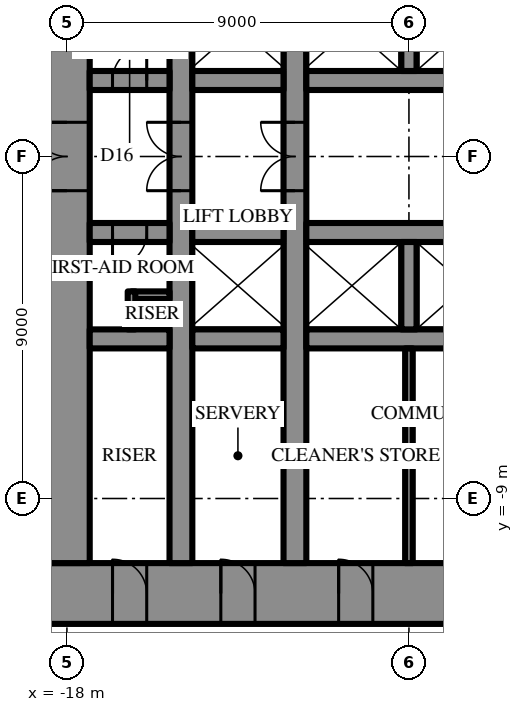
"""IFC4 building model, lengths in metres.
Left out: names, types, materials, properties, quantities, classifications, styles, units other than length and angle.
Written with IfcOpenShell. Run it as: python <this file> out.ifc"""

import sys

from ifc_helpers import new_model, si_unit, direction, frame, frame_2d, origin, place, context, subcontext, project, spatial, rectangle, extrude, element, fill, save


model = new_model("IFC4")
c1 = context("Model", 3, precision=1e-05, world=origin(), true_north=direction((0.0, 1.0)))
c2 = subcontext(c1, "Body", "Model", "MODEL_VIEW")
j1 = project(units=[si_unit("LENGTHUNIT", "METRE"), si_unit("PLANEANGLEUNIT", "RADIAN")], contexts=[c1])
p1 = place(None, origin())
s1 = spatial("IfcSite", under=j1, at=p1, CompositionType="ELEMENT")
p2 = place(p1, origin())
s2 = spatial("IfcBuilding", under=s1, at=p2, CompositionType="ELEMENT")
p3 = place(p2, frame((0.0, 0.0, 148.9)))
s3 = spatial("IfcBuildingStorey", under=s2, at=p3, CompositionType="ELEMENT", Elevation=148.9)
p4 = place(p3, frame((18.6, -11.5, 0.0), z_axis=(0.0, 0.0, 1.0), x_axis=(-1.0, 0.0, 0.0)))
e1 = element("IfcWall", 1, at=p4, inside=s3, PredefinedType="SHEAR", context=c2, shape_type="SweptSolid", body=[
    extrude(rectangle(XDim=37.2, YDim=1.6, at=frame_2d((18.6, 0.0))), origin(), (0.0, 0.0, 1.0), 4.2),
])
p5 = place(p4, frame((19.45, 0.0, 0.0)))
e2 = element("IfcOpeningElement", 2, at=p5, cuts=e1, PredefinedType="OPENING", context=c2, shape_type="SweptSolid", body=[
    extrude(rectangle(XDim=0.9, YDim=2.2, at=frame_2d((0.45, 1.1))), frame((0.0, 0.81, 0.0), z_axis=(0.0, -1.0, 0.0), x_axis=(1.0, 0.0, 0.0)), (0.0, 0.0, 1.0), 1.62),
])
p6 = place(p4, frame((22.45, 0.0, 0.0)))
e3 = element("IfcOpeningElement", 3, at=p6, cuts=e1, PredefinedType="OPENING", context=c2, shape_type="SweptSolid", body=[
    extrude(rectangle(XDim=0.9, YDim=2.2, at=frame_2d((0.45, 1.1))), frame((0.0, 0.81, 0.0), z_axis=(0.0, -1.0, 0.0), x_axis=(1.0, 0.0, 0.0)), (0.0, 0.0, 1.0), 1.62),
])
p7 = place(p4, frame((25.5, 0.0, 0.0)))
e4 = element("IfcOpeningElement", 4, at=p7, cuts=e1, PredefinedType="OPENING", context=c2, shape_type="SweptSolid", body=[
    extrude(rectangle(XDim=1.0, YDim=2.2, at=frame_2d((0.5, 1.1))), frame((0.0, 0.81, 0.0), z_axis=(0.0, -1.0, 0.0), x_axis=(1.0, 0.0, 0.0)), (0.0, 0.0, 1.0), 1.62),
])
p8 = place(p4, frame((1.8, 0.0, 0.0)))
e5 = element("IfcOpeningElement", 5, at=p8, cuts=e1, PredefinedType="OPENING", context=c2, shape_type="SweptSolid", body=[
    extrude(rectangle(XDim=0.9, YDim=2.2, at=frame_2d((0.45, 1.1))), frame((0.0, 0.81, 0.0), z_axis=(0.0, -1.0, 0.0), x_axis=(1.0, 0.0, 0.0)), (0.0, 0.0, 1.0), 1.62),
])
p9 = place(p4, frame((4.65, 0.0, 0.0)))
e6 = element("IfcOpeningElement", 6, at=p9, cuts=e1, PredefinedType="OPENING", context=c2, shape_type="SweptSolid", body=[
    extrude(rectangle(XDim=0.9, YDim=2.2, at=frame_2d((0.45, 1.1))), frame((0.0, 0.81, 0.0), z_axis=(0.0, -1.0, 0.0), x_axis=(1.0, 0.0, 0.0)), (0.0, 0.0, 1.0), 1.62),
])
p10 = place(p4, frame((7.75, 0.0, 0.0)))
e7 = element("IfcOpeningElement", 7, at=p10, cuts=e1, PredefinedType="OPENING", context=c2, shape_type="SweptSolid", body=[
    extrude(rectangle(XDim=0.9, YDim=2.2, at=frame_2d((0.45, 1.1))), frame((0.0, 0.81, 0.0), z_axis=(0.0, -1.0, 0.0), x_axis=(1.0, 0.0, 0.0)), (0.0, 0.0, 1.0), 1.62),
])
p11 = place(p4, frame((28.55, 0.0, 0.0)))
e8 = element("IfcOpeningElement", 8, at=p11, cuts=e1, PredefinedType="OPENING", context=c2, shape_type="SweptSolid", body=[
    extrude(rectangle(XDim=0.9, YDim=2.2, at=frame_2d((0.45, 1.1))), frame((0.0, 0.81, 0.0), z_axis=(0.0, -1.0, 0.0), x_axis=(1.0, 0.0, 0.0)), (0.0, 0.0, 1.0), 1.62),
])
p12 = place(p4, frame((31.65, 0.0, 0.0)))
e9 = element("IfcOpeningElement", 9, at=p12, cuts=e1, PredefinedType="OPENING", context=c2, shape_type="SweptSolid", body=[
    extrude(rectangle(XDim=0.9, YDim=2.2, at=frame_2d((0.45, 1.1))), frame((0.0, 0.81, 0.0), z_axis=(0.0, -1.0, 0.0), x_axis=(1.0, 0.0, 0.0)), (0.0, 0.0, 1.0), 1.62),
])
p13 = place(p4, frame((34.5, 0.0, 0.0)))
e10 = element("IfcOpeningElement", 10, at=p13, cuts=e1, PredefinedType="OPENING", context=c2, shape_type="SweptSolid", body=[
    extrude(rectangle(XDim=0.9, YDim=2.2, at=frame_2d((0.45, 1.1))), frame((0.0, 0.81, 0.0), z_axis=(0.0, -1.0, 0.0), x_axis=(1.0, 0.0, 0.0)), (0.0, 0.0, 1.0), 1.62),
])
p14 = place(p3, frame((-18.0, 10.7, 0.0), z_axis=(0.0, 0.0, 1.0), x_axis=(0.0, -1.0, 0.0)))
e11 = element("IfcWall", 11, at=p14, inside=s3, PredefinedType="SHEAR", context=c2, shape_type="SweptSolid", body=[
    extrude(rectangle(XDim=21.4, YDim=1.2, at=frame_2d((10.7, 0.0))), origin(), (0.0, 0.0, 1.0), 4.2),
])
p15 = place(p14, frame((9.8, 0.0, 0.0)))
e12 = element("IfcOpeningElement", 12, at=p15, cuts=e11, PredefinedType="OPENING", context=c2, shape_type="SweptSolid", body=[
    extrude(rectangle(XDim=1.8, YDim=2.4, at=frame_2d((0.9, 1.2))), frame((0.0, 0.61, 0.0), z_axis=(0.0, -1.0, 0.0), x_axis=(1.0, 0.0, 0.0)), (0.0, 0.0, 1.0), 1.22),
])
p16 = place(p3, frame((-12.0, -10.7, 0.0), z_axis=(0.0, 0.0, 1.0), x_axis=(0.0, 1.0, 0.0)))
e13 = element("IfcWall", 13, at=p16, inside=s3, PredefinedType="SHEAR", context=c2, shape_type="SweptSolid", body=[
    extrude(rectangle(XDim=21.4, YDim=0.6, at=frame_2d((10.7, 0.0))), origin(), (0.0, 0.0, 1.0), 4.2),
])
p17 = place(p16, frame((9.8, 0.0, 0.0)))
e14 = element("IfcOpeningElement", 14, at=p17, cuts=e13, PredefinedType="OPENING", context=c2, shape_type="SweptSolid", body=[
    extrude(rectangle(XDim=1.8, YDim=2.4, at=frame_2d((0.9, 1.2))), frame((0.0, 0.31, 0.0), z_axis=(0.0, -1.0, 0.0), x_axis=(1.0, 0.0, 0.0)), (0.0, 0.0, 1.0), 0.62),
])
p18 = place(p3, frame((-15.0, -10.7, 0.0), z_axis=(0.0, 0.0, 1.0), x_axis=(0.0, 1.0, 0.0)))
e15 = element("IfcWall", 15, at=p18, inside=s3, PredefinedType="SHEAR", context=c2, shape_type="SweptSolid", body=[
    extrude(rectangle(XDim=21.4, YDim=0.6, at=frame_2d((10.7, 0.0))), origin(), (0.0, 0.0, 1.0), 4.2),
])
p19 = place(p18, frame((9.8, 0.0, 0.0)))
e16 = element("IfcOpeningElement", 16, at=p19, cuts=e15, PredefinedType="OPENING", context=c2, shape_type="SweptSolid", body=[
    extrude(rectangle(XDim=1.8, YDim=2.4, at=frame_2d((0.9, 1.2))), frame((0.0, 0.31, 0.0), z_axis=(0.0, -1.0, 0.0), x_axis=(1.0, 0.0, 0.0)), (0.0, 0.0, 1.0), 0.62),
])
p20 = place(p3, frame((-17.4, 2.0, 0.0), z_axis=(0.0, 0.0, 1.0), x_axis=(1.0, 0.0, 0.0)))
e17 = element("IfcWall", 17, at=p20, inside=s3, PredefinedType="SHEAR", context=c2, shape_type="SweptSolid", body=[
    extrude(rectangle(XDim=2.1, YDim=0.5, at=frame_2d((1.05, 0.0))), origin(), (0.0, 0.0, 1.0), 4.2),
])
p21 = place(p20, frame((0.6, 0.0, 0.0)))
e18 = element("IfcOpeningElement", 18, at=p21, cuts=e17, PredefinedType="OPENING", context=c2, shape_type="SweptSolid", body=[
    extrude(rectangle(XDim=0.9, YDim=2.2, at=frame_2d((0.45, 1.1))), frame((0.0, 0.26, 0.0), z_axis=(0.0, -1.0, 0.0), x_axis=(1.0, 0.0, 0.0)), (0.0, 0.0, 1.0), 0.52),
])
p22 = place(p3, frame((-14.7, 2.0, 0.0), z_axis=(0.0, 0.0, 1.0), x_axis=(1.0, 0.0, 0.0)))
e19 = element("IfcWall", 19, at=p22, inside=s3, PredefinedType="SHEAR", context=c2, shape_type="SweptSolid", body=[
    extrude(rectangle(XDim=2.4, YDim=0.5, at=frame_2d((1.2, 0.0))), origin(), (0.0, 0.0, 1.0), 4.2),
])
p23 = place(p3, frame((-11.7, 2.0, 0.0), z_axis=(0.0, 0.0, 1.0), x_axis=(1.0, 0.0, 0.0)))
e20 = element("IfcWall", 20, at=p23, inside=s3, PredefinedType="SHEAR", context=c2, shape_type="SweptSolid", body=[
    extrude(rectangle(XDim=5.9, YDim=0.5, at=frame_2d((2.95, 0.0))), origin(), (0.0, 0.0, 1.0), 4.2),
])
p24 = place(p3, frame((-9.0, 2.25, 0.0), z_axis=(0.0, 0.0, 1.0), x_axis=(0.0, 1.0, 0.0)))
e21 = element("IfcWall", 21, at=p24, inside=s3, PredefinedType="SHEAR", context=c2, shape_type="SweptSolid", body=[
    extrude(rectangle(XDim=2.3, YDim=0.4, at=frame_2d((1.15, 0.0))), origin(), (0.0, 0.0, 1.0), 4.2),
])
p25 = place(p3, frame((3.2, -2.0, 0.0), z_axis=(0.0, 0.0, 1.0), x_axis=(-1.0, 0.0, 0.0)))
e22 = element("IfcWall", 22, at=p25, inside=s3, PredefinedType="SHEAR", context=c2, shape_type="SweptSolid", body=[
    extrude(rectangle(XDim=14.9, YDim=0.5, at=frame_2d((7.45, 0.0))), origin(), (0.0, 0.0, 1.0), 4.2),
])
p26 = place(p25, frame((1.15, 0.0, 0.0)))
e23 = element("IfcOpeningElement", 23, at=p26, cuts=e22, PredefinedType="OPENING", context=c2, shape_type="SweptSolid", body=[
    extrude(rectangle(XDim=1.1, YDim=2.2, at=frame_2d((0.55, 1.1))), frame((0.0, 0.26, 0.0), z_axis=(0.0, -1.0, 0.0), x_axis=(1.0, 0.0, 0.0)), (0.0, 0.0, 1.0), 0.52),
])
p27 = place(p25, frame((4.15, 0.0, 0.0)))
e24 = element("IfcOpeningElement", 24, at=p27, cuts=e22, PredefinedType="OPENING", context=c2, shape_type="SweptSolid", body=[
    extrude(rectangle(XDim=1.1, YDim=2.2, at=frame_2d((0.55, 1.1))), frame((0.0, 0.26, 0.0), z_axis=(0.0, -1.0, 0.0), x_axis=(1.0, 0.0, 0.0)), (0.0, 0.0, 1.0), 0.52),
])
p28 = place(p25, frame((7.15, 0.0, 0.0)))
e25 = element("IfcOpeningElement", 25, at=p28, cuts=e22, PredefinedType="OPENING", context=c2, shape_type="SweptSolid", body=[
    extrude(rectangle(XDim=1.1, YDim=2.2, at=frame_2d((0.55, 1.1))), frame((0.0, 0.26, 0.0), z_axis=(0.0, -1.0, 0.0), x_axis=(1.0, 0.0, 0.0)), (0.0, 0.0, 1.0), 0.52),
])
p29 = place(p25, frame((10.15, 0.0, 0.0)))
e26 = element("IfcOpeningElement", 26, at=p29, cuts=e22, PredefinedType="OPENING", context=c2, shape_type="SweptSolid", body=[
    extrude(rectangle(XDim=1.1, YDim=2.2, at=frame_2d((0.55, 1.1))), frame((0.0, 0.26, 0.0), z_axis=(0.0, -1.0, 0.0), x_axis=(1.0, 0.0, 0.0)), (0.0, 0.0, 1.0), 0.52),
])
p30 = place(p3, frame((-12.3, -2.0, 0.0), z_axis=(0.0, 0.0, 1.0), x_axis=(-1.0, 0.0, 0.0)))
e27 = element("IfcWall", 27, at=p30, inside=s3, PredefinedType="SHEAR", context=c2, shape_type="SweptSolid", body=[
    extrude(rectangle(XDim=2.4, YDim=0.5, at=frame_2d((1.2, 0.0))), origin(), (0.0, 0.0, 1.0), 4.2),
])
p31 = place(p3, frame((-15.3, -2.0, 0.0), z_axis=(0.0, 0.0, 1.0), x_axis=(-1.0, 0.0, 0.0)))
e28 = element("IfcWall", 28, at=p31, inside=s3, PredefinedType="SHEAR", context=c2, shape_type="SweptSolid", body=[
    extrude(rectangle(XDim=2.1, YDim=0.5, at=frame_2d((1.05, 0.0))), origin(), (0.0, 0.0, 1.0), 4.2),
])
p32 = place(p31, frame((0.6, 0.0, 0.0)))
e29 = element("IfcOpeningElement", 29, at=p32, cuts=e28, PredefinedType="OPENING", context=c2, shape_type="SweptSolid", body=[
    extrude(rectangle(XDim=0.9, YDim=2.2, at=frame_2d((0.45, 1.1))), frame((0.0, 0.26, 0.0), z_axis=(0.0, -1.0, 0.0), x_axis=(1.0, 0.0, 0.0)), (0.0, 0.0, 1.0), 0.52),
])
p33 = place(p3, frame((11.7, -4.8, 0.0), z_axis=(0.0, 0.0, 1.0), x_axis=(-1.0, 0.0, 0.0)))
e30 = element("IfcWall", 30, at=p33, inside=s3, PredefinedType="SHEAR", context=c2, shape_type="SweptSolid", body=[
    extrude(rectangle(XDim=23.4, YDim=0.5, at=frame_2d((11.7, 0.0))), origin(), (0.0, 0.0, 1.0), 4.2),
])
p34 = place(p33, frame((6.6, 0.0, 0.0)))
e31 = element("IfcOpeningElement", 31, at=p34, cuts=e30, PredefinedType="OPENING", context=c2, shape_type="SweptSolid", body=[
    extrude(rectangle(XDim=1.2, YDim=2.2, at=frame_2d((0.6, 1.1))), frame((0.0, 0.26, 0.0), z_axis=(0.0, -1.0, 0.0), x_axis=(1.0, 0.0, 0.0)), (0.0, 0.0, 1.0), 0.52),
])
p35 = place(p33, frame((3.6, 0.0, 0.0)))
e32 = element("IfcOpeningElement", 32, at=p35, cuts=e30, PredefinedType="OPENING", context=c2, shape_type="SweptSolid", body=[
    extrude(rectangle(XDim=1.2, YDim=2.2, at=frame_2d((0.6, 1.1))), frame((0.0, 0.26, 0.0), z_axis=(0.0, -1.0, 0.0), x_axis=(1.0, 0.0, 0.0)), (0.0, 0.0, 1.0), 0.52),
])
p36 = place(p3, frame((-12.3, -4.8, 0.0), z_axis=(0.0, 0.0, 1.0), x_axis=(-1.0, 0.0, 0.0)))
e33 = element("IfcWall", 33, at=p36, inside=s3, PredefinedType="SHEAR", context=c2, shape_type="SweptSolid", body=[
    extrude(rectangle(XDim=2.4, YDim=0.5, at=frame_2d((1.2, 0.0))), origin(), (0.0, 0.0, 1.0), 4.2),
])
p37 = place(p3, frame((-15.3, -4.8, 0.0), z_axis=(0.0, 0.0, 1.0), x_axis=(-1.0, 0.0, 0.0)))
e34 = element("IfcWall", 34, at=p37, inside=s3, PredefinedType="SHEAR", context=c2, shape_type="SweptSolid", body=[
    extrude(rectangle(XDim=2.1, YDim=0.5, at=frame_2d((1.05, 0.0))), origin(), (0.0, 0.0, 1.0), 4.2),
])
p38 = place(p3, frame((-9.0, -2.25, 0.0), z_axis=(0.0, 0.0, 1.0), x_axis=(0.0, -1.0, 0.0)))
e35 = element("IfcWall", 35, at=p38, inside=s3, PredefinedType="SHEAR", context=c2, shape_type="SweptSolid", body=[
    extrude(rectangle(XDim=2.3, YDim=0.4, at=frame_2d((1.15, 0.0))), origin(), (0.0, 0.0, 1.0), 4.2),
])
p39 = place(p3, frame((-9.0, -5.05, 0.0), z_axis=(0.0, 0.0, 1.0), x_axis=(0.0, -1.0, 0.0)))
e36 = element("IfcWall", 36, at=p39, inside=s3, PredefinedType="PARTITIONING", context=c2, shape_type="SweptSolid", body=[
    extrude(rectangle(XDim=5.65, YDim=0.2, at=frame_2d((2.825, 0.0))), origin(), (0.0, 0.0, 1.0), 4.0),
])
for number, where, z_axis, x_axis in (
    (37, (-15.3, -3.65, 0.0), (0.0, 0.0, 1.0), (-1.0, 0.0, 0.0)),
    (38, (-16.3, -3.55, 0.0), (0.0, 0.0, 1.0), (0.0, -1.0, 0.0)),
):
    element("IfcWall", number, at=place(p3, frame(where, z_axis=z_axis, x_axis=x_axis)), inside=s3, PredefinedType="PARTITIONING", context=c2, shape_type="SweptSolid", body=[
        extrude(rectangle(XDim=1.0, YDim=0.2, at=frame_2d((0.5, 0.0))), origin(), (0.0, 0.0, 1.0), 4.0),
    ])
p40 = place(p15, frame((1.8, 0.0, 0.0), z_axis=(0.0, 0.0, 1.0), x_axis=(-1.0, 0.0, 0.0)))
e39 = element("IfcDoor", 39, at=p40, inside=s3, OperationType="DOUBLE_DOOR_SINGLE_SWING", PredefinedType="DOOR", context=c2, shape_type="SweptSolid", body=[
    extrude(rectangle(XDim=1.8, YDim=2.4, at=frame_2d((0.9, 1.2))), frame((0.0, 0.025, 0.0), z_axis=(0.0, -1.0, 0.0), x_axis=(1.0, 0.0, 0.0)), (0.0, 0.0, 1.0), 0.05),
])
fill(e12, e39)
p41 = place(p11, frame((0.9, 0.0, 0.0), z_axis=(0.0, 0.0, 1.0), x_axis=(-1.0, 0.0, 0.0)))
e40 = element("IfcDoor", 40, at=p41, inside=s3, OperationType="SINGLE_SWING_RIGHT", PredefinedType="DOOR", context=c2, shape_type="SweptSolid", body=[
    extrude(rectangle(XDim=0.9, YDim=2.2, at=frame_2d((0.45, 1.1))), frame((0.0, 0.025, 0.0), z_axis=(0.0, -1.0, 0.0), x_axis=(1.0, 0.0, 0.0)), (0.0, 0.0, 1.0), 0.05),
])
fill(e8, e40)
p42 = place(p12, frame((0.9, 0.0, 0.0), z_axis=(0.0, 0.0, 1.0), x_axis=(-1.0, 0.0, 0.0)))
e41 = element("IfcDoor", 41, at=p42, inside=s3, OperationType="SINGLE_SWING_RIGHT", PredefinedType="DOOR", context=c2, shape_type="SweptSolid", body=[
    extrude(rectangle(XDim=0.9, YDim=2.2, at=frame_2d((0.45, 1.1))), frame((0.0, 0.025, 0.0), z_axis=(0.0, -1.0, 0.0), x_axis=(1.0, 0.0, 0.0)), (0.0, 0.0, 1.0), 0.05),
])
fill(e9, e41)
p43 = place(p13, frame((0.9, 0.0, 0.0), z_axis=(0.0, 0.0, 1.0), x_axis=(-1.0, 0.0, 0.0)))
e42 = element("IfcDoor", 42, at=p43, inside=s3, OperationType="SINGLE_SWING_RIGHT", PredefinedType="DOOR", context=c2, shape_type="SweptSolid", body=[
    extrude(rectangle(XDim=0.9, YDim=2.2, at=frame_2d((0.45, 1.1))), frame((0.0, 0.025, 0.0), z_axis=(0.0, -1.0, 0.0), x_axis=(1.0, 0.0, 0.0)), (0.0, 0.0, 1.0), 0.05),
])
fill(e10, e42)
p44 = place(p21, origin())
e43 = element("IfcDoor", 43, at=p44, inside=s3, OperationType="SINGLE_SWING_LEFT", PredefinedType="DOOR", context=c2, shape_type="SweptSolid", body=[
    extrude(rectangle(XDim=0.9, YDim=2.2, at=frame_2d((0.45, 1.1))), frame((0.0, 0.025, 0.0), z_axis=(0.0, -1.0, 0.0), x_axis=(1.0, 0.0, 0.0)), (0.0, 0.0, 1.0), 0.05),
])
fill(e18, e43)
p45 = place(p32, origin())
e44 = element("IfcDoor", 44, at=p45, inside=s3, OperationType="SINGLE_SWING_LEFT", PredefinedType="DOOR", context=c2, shape_type="SweptSolid", body=[
    extrude(rectangle(XDim=0.9, YDim=2.2, at=frame_2d((0.45, 1.1))), frame((0.0, 0.025, 0.0), z_axis=(0.0, -1.0, 0.0), x_axis=(1.0, 0.0, 0.0)), (0.0, 0.0, 1.0), 0.05),
])
fill(e29, e44)
p46 = place(p17, origin())
e45 = element("IfcDoor", 45, at=p46, inside=s3, OperationType="DOUBLE_DOOR_SINGLE_SWING", PredefinedType="DOOR", context=c2, shape_type="SweptSolid", body=[
    extrude(rectangle(XDim=1.8, YDim=2.4, at=frame_2d((0.9, 1.2))), frame((0.0, 0.025, 0.0), z_axis=(0.0, -1.0, 0.0), x_axis=(1.0, 0.0, 0.0)), (0.0, 0.0, 1.0), 0.05),
])
fill(e14, e45)
p47 = place(p19, origin())
e46 = element("IfcDoor", 46, at=p47, inside=s3, OperationType="DOUBLE_DOOR_SINGLE_SWING", PredefinedType="DOOR", context=c2, shape_type="SweptSolid", body=[
    extrude(rectangle(XDim=1.8, YDim=2.4, at=frame_2d((0.9, 1.2))), frame((0.0, 0.025, 0.0), z_axis=(0.0, -1.0, 0.0), x_axis=(1.0, 0.0, 0.0)), (0.0, 0.0, 1.0), 0.05),
])
fill(e16, e46)
save(model, sys.argv[1])
